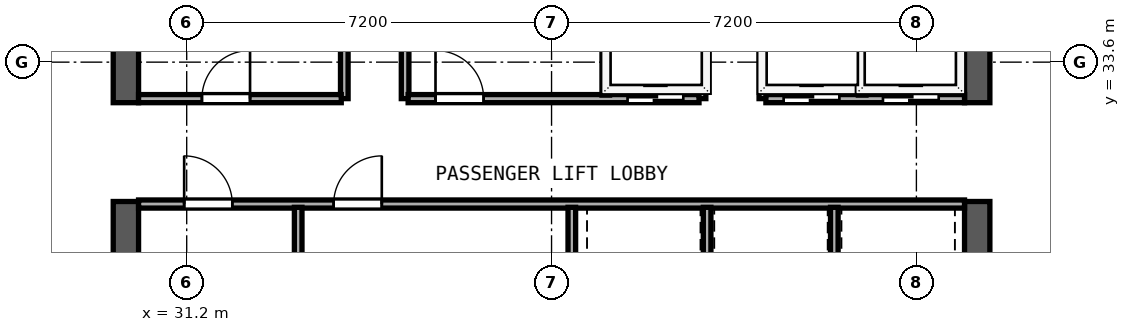
"""IFC4 building model, lengths in metres.
Left out: names, types, materials, properties, quantities, classifications, styles, units other than length and angle.
Written with IfcOpenShell. Run it as: python <this file> out.ifc"""

import sys

from ifc_helpers import new_model, si_unit, direction, frame, frame_2d, origin, place, context, subcontext, project, spatial, rectangle, extrude, element, fill, save


model = new_model("IFC4")
c1 = context("Model", 3, precision=1e-05, world=origin(), true_north=direction((0.0, 1.0)))
c2 = subcontext(c1, "Body", "Model", "MODEL_VIEW")
j1 = project(units=[si_unit("LENGTHUNIT", "METRE"), si_unit("PLANEANGLEUNIT", "RADIAN")], contexts=[c1])
p1 = place(None, origin())
s1 = spatial("IfcSite", under=j1, at=p1, CompositionType="ELEMENT")
p2 = place(p1, origin())
s2 = spatial("IfcBuilding", under=s1, at=p2, CompositionType="ELEMENT")
p3 = place(p2, frame((0.0, 0.0, 282.2)))
s3 = spatial("IfcBuildingStorey", under=s2, at=p3, CompositionType="ELEMENT", Elevation=282.2)
p4 = place(p3, frame((30.0, 26.65, 0.0), z_axis=(0.0, 0.0, 1.0), x_axis=(0.0, 1.0, 0.0)))
e1 = element("IfcWall", 1, at=p4, inside=s3, PredefinedType="SHEAR", context=c2, shape_type="SweptSolid", body=[
    extrude(rectangle(XDim=4.2, YDim=0.5, at=frame_2d((2.1, 0.0))), origin(), (0.0, 0.0, 1.0), 3.72),
])
p5 = place(p3, frame((30.0, 32.8, 0.0), z_axis=(0.0, 0.0, 1.0), x_axis=(0.0, 1.0, 0.0)))
e2 = element("IfcWall", 2, at=p5, inside=s3, PredefinedType="SHEAR", context=c2, shape_type="SweptSolid", body=[
    extrude(rectangle(XDim=10.15, YDim=0.5, at=frame_2d((5.075, 0.0))), origin(), (0.0, 0.0, 1.0), 3.72),
])
p6 = place(p3, frame((46.8, 26.65, 0.0), z_axis=(0.0, 0.0, 1.0), x_axis=(0.0, 1.0, 0.0)))
e3 = element("IfcWall", 3, at=p6, inside=s3, PredefinedType="SHEAR", context=c2, shape_type="SweptSolid", body=[
    extrude(rectangle(XDim=4.2, YDim=0.5, at=frame_2d((2.1, 0.0))), origin(), (0.0, 0.0, 1.0), 3.72),
])
p7 = place(p6, frame((1.35, 0.0, 0.0), z_axis=(0.0, 0.0, 1.0), x_axis=(-1.0, 0.0, 0.0)))
e4 = element("IfcOpeningElement", 4, at=p7, cuts=e3, PredefinedType="OPENING", context=c2, shape_type="SweptSolid", body=[
    extrude(rectangle(XDim=0.9, YDim=2.1, at=frame_2d((0.45, 1.05))), frame((0.0, 0.26, 0.0), z_axis=(0.0, -1.0, 0.0), x_axis=(1.0, 0.0, 0.0)), (0.0, 0.0, 1.0), 0.52),
])
p8 = place(p3, frame((46.8, 32.8, 0.0), z_axis=(0.0, 0.0, 1.0), x_axis=(0.0, 1.0, 0.0)))
e5 = element("IfcWall", 5, at=p8, inside=s3, PredefinedType="SHEAR", context=c2, shape_type="SweptSolid", body=[
    extrude(rectangle(XDim=10.15, YDim=0.5, at=frame_2d((5.075, 0.0))), origin(), (0.0, 0.0, 1.0), 3.72),
])
for number, where, z_axis, x_axis in (
    (6, (34.31, 32.88, 0.0), (0.0, 0.0, 1.0), (0.0, 1.0, 0.0)),
    (7, (35.51, 32.88, 0.0), (0.0, 0.0, 1.0), (0.0, 1.0, 0.0)),
    (8, (41.37, 32.88, 0.0), (0.0, 0.0, 1.0), (0.0, 1.0, 0.0)),
    (9, (42.57, 32.88, 0.0), (0.0, 0.0, 1.0), (0.0, 1.0, 0.0)),
):
    element("IfcWall", number, at=place(p3, frame(where, z_axis=z_axis, x_axis=x_axis)), inside=s3, PredefinedType="SOLIDWALL", context=c2, shape_type="SweptSolid", body=[
        extrude(rectangle(XDim=2.17, YDim=0.15, at=frame_2d((1.085, 0.0))), origin(), (0.0, 0.0, 1.0), 3.72),
    ])
p9 = place(p3, frame((30.25, 32.88, 0.0), z_axis=(0.0, 0.0, 1.0), x_axis=(1.0, 0.0, 0.0)))
e10 = element("IfcWall", 10, at=p9, inside=s3, PredefinedType="SOLIDWALL", context=c2, shape_type="SweptSolid", body=[
    extrude(rectangle(XDim=4.0, YDim=0.16, at=frame_2d((2.0, 0.0))), origin(), (0.0, 0.0, 1.0), 3.72),
])
p10 = place(p9, frame((2.2, 0.0, 0.0), z_axis=(0.0, 0.0, 1.0), x_axis=(-1.0, 0.0, 0.0)))
e11 = element("IfcOpeningElement", 11, at=p10, cuts=e10, PredefinedType="OPENING", context=c2, shape_type="SweptSolid", body=[
    extrude(rectangle(XDim=0.95, YDim=2.12, at=frame_2d((0.475, 1.06))), frame((0.0, 0.09, 0.0), z_axis=(0.0, -1.0, 0.0), x_axis=(1.0, 0.0, 0.0)), (0.0, 0.0, 1.0), 0.18),
])
p11 = place(p3, frame((35.57, 32.88, 0.0), z_axis=(0.0, 0.0, 1.0), x_axis=(1.0, 0.0, 0.0)))
e12 = element("IfcWall", 12, at=p11, inside=s3, PredefinedType="SOLIDWALL", context=c2, shape_type="SweptSolid", body=[
    extrude(rectangle(XDim=5.74, YDim=0.16, at=frame_2d((2.87, 0.0))), origin(), (0.0, 0.0, 1.0), 3.72),
])
p12 = place(p11, frame((1.49, 0.0, 0.0), z_axis=(0.0, 0.0, 1.0), x_axis=(-1.0, 0.0, 0.0)))
e13 = element("IfcOpeningElement", 13, at=p12, cuts=e12, PredefinedType="OPENING", context=c2, shape_type="SweptSolid", body=[
    extrude(rectangle(XDim=0.95, YDim=2.12, at=frame_2d((0.475, 1.06))), frame((0.0, 0.09, 0.0), z_axis=(0.0, -1.0, 0.0), x_axis=(1.0, 0.0, 0.0)), (0.0, 0.0, 1.0), 0.18),
])
p13 = place(p11, frame((5.43, 0.0, 0.0), z_axis=(0.0, 0.0, 1.0), x_axis=(-1.0, 0.0, 0.0)))
e14 = element("IfcOpeningElement", 14, at=p13, cuts=e12, PredefinedType="OPENING", context=c2, shape_type="SweptSolid", body=[
    extrude(rectangle(XDim=1.1, YDim=2.2, at=frame_2d((0.55, 1.1))), frame((0.0, 0.09, 0.0), z_axis=(0.0, -1.0, 0.0), x_axis=(1.0, 0.0, 0.0)), (0.0, 0.0, 1.0), 0.18),
])
p14 = place(p3, frame((42.63, 32.88, 0.0), z_axis=(0.0, 0.0, 1.0), x_axis=(1.0, 0.0, 0.0)))
e15 = element("IfcWall", 15, at=p14, inside=s3, PredefinedType="SOLIDWALL", context=c2, shape_type="SweptSolid", body=[
    extrude(rectangle(XDim=3.92, YDim=0.16, at=frame_2d((1.96, 0.0))), origin(), (0.0, 0.0, 1.0), 3.72),
])
p15 = place(p14, frame((1.45, 0.0, 0.0), z_axis=(0.0, 0.0, 1.0), x_axis=(-1.0, 0.0, 0.0)))
e16 = element("IfcOpeningElement", 16, at=p15, cuts=e15, PredefinedType="OPENING", context=c2, shape_type="SweptSolid", body=[
    extrude(rectangle(XDim=1.1, YDim=2.2, at=frame_2d((0.55, 1.1))), frame((0.0, 0.09, 0.0), z_axis=(0.0, -1.0, 0.0), x_axis=(1.0, 0.0, 0.0)), (0.0, 0.0, 1.0), 0.18),
])
p16 = place(p14, frame((3.41, 0.0, 0.0), z_axis=(0.0, 0.0, 1.0), x_axis=(-1.0, 0.0, 0.0)))
e17 = element("IfcOpeningElement", 17, at=p16, cuts=e15, PredefinedType="OPENING", context=c2, shape_type="SweptSolid", body=[
    extrude(rectangle(XDim=1.1, YDim=2.2, at=frame_2d((0.55, 1.1))), frame((0.0, 0.09, 0.0), z_axis=(0.0, -1.0, 0.0), x_axis=(1.0, 0.0, 0.0)), (0.0, 0.0, 1.0), 0.18),
])
for number, where, z_axis, x_axis in (
    (18, (39.47, 32.95, 0.0), (0.0, 0.0, 1.0), (0.0, 1.0, 0.0)),
    (19, (44.53, 32.95, 0.0), (0.0, 0.0, 1.0), (0.0, 1.0, 0.0)),
):
    element("IfcWall", number, at=place(p3, frame(where, z_axis=z_axis, x_axis=x_axis)), inside=s3, PredefinedType="SOLIDWALL", context=c2, shape_type="SweptSolid", body=[
        extrude(rectangle(XDim=2.05, YDim=0.15, at=frame_2d((1.025, 0.0))), origin(), (0.0, 0.0, 1.0), 3.72),
    ])
p17 = place(p3, frame((30.25, 30.8, 0.0), z_axis=(0.0, 0.0, 1.0), x_axis=(1.0, 0.0, 0.0)))
e20 = element("IfcWall", 20, at=p17, inside=s3, PredefinedType="SOLIDWALL", context=c2, shape_type="SweptSolid", body=[
    extrude(rectangle(XDim=16.3, YDim=0.16, at=frame_2d((8.15, 0.0))), origin(), (0.0, 0.0, 1.0), 3.72),
])
p18 = place(p17, frame((0.9, 0.0, 0.0)))
e21 = element("IfcOpeningElement", 21, at=p18, cuts=e20, PredefinedType="OPENING", context=c2, shape_type="SweptSolid", body=[
    extrude(rectangle(XDim=0.95, YDim=2.12, at=frame_2d((0.475, 1.06))), frame((0.0, 0.09, 0.0), z_axis=(0.0, -1.0, 0.0), x_axis=(1.0, 0.0, 0.0)), (0.0, 0.0, 1.0), 0.18),
])
p19 = place(p17, frame((3.85, 0.0, 0.0)))
e22 = element("IfcOpeningElement", 22, at=p19, cuts=e20, PredefinedType="OPENING", context=c2, shape_type="SweptSolid", body=[
    extrude(rectangle(XDim=0.95, YDim=2.12, at=frame_2d((0.475, 1.06))), frame((0.0, 0.09, 0.0), z_axis=(0.0, -1.0, 0.0), x_axis=(1.0, 0.0, 0.0)), (0.0, 0.0, 1.0), 0.18),
])
p20 = place(p3, frame((38.8, 26.66, 0.0), z_axis=(0.0, 0.0, 1.0), x_axis=(0.0, 1.0, 0.0)))
e23 = element("IfcWall", 23, at=p20, inside=s3, PredefinedType="SOLIDWALL", context=c2, shape_type="SweptSolid", body=[
    extrude(rectangle(XDim=4.075, YDim=0.15, at=frame_2d((2.038, 0.0))), origin(), (0.0, 0.0, 1.0), 3.72),
])
p21 = place(p3, frame((33.4, 26.66, 0.0), z_axis=(0.0, 0.0, 1.0), x_axis=(0.0, 1.0, 0.0)))
e24 = element("IfcWall", 24, at=p21, inside=s3, PredefinedType="PARTITIONING", context=c2, shape_type="SweptSolid", body=[
    extrude(rectangle(XDim=4.075, YDim=0.15, at=frame_2d((2.038, 0.0))), origin(), (0.0, 0.0, 1.0), 3.72),
])
for number, where, z_axis, x_axis in (
    (25, (41.47, 28.75, 0.0), (0.0, 0.0, 1.0), (0.0, 1.0, 0.0)),
    (26, (43.98, 28.75, 0.0), (0.0, 0.0, 1.0), (0.0, 1.0, 0.0)),
):
    element("IfcWall", number, at=place(p3, frame(where, z_axis=z_axis, x_axis=x_axis)), inside=s3, PredefinedType="SOLIDWALL", context=c2, shape_type="SweptSolid", body=[
        extrude(rectangle(XDim=1.985, YDim=0.15, at=frame_2d((0.993, 0.0))), origin(), (0.0, 0.0, 1.0), 3.72),
    ])
p22 = place(p10, origin())
e27 = element("IfcDoor", 27, at=p22, inside=s3, OperationType="SINGLE_SWING_LEFT", PredefinedType="DOOR", context=c2, shape_type="SweptSolid", body=[
    extrude(rectangle(XDim=0.95, YDim=2.12, at=frame_2d((0.475, 1.06))), frame((0.0, 0.025, 0.0), z_axis=(0.0, -1.0, 0.0), x_axis=(1.0, 0.0, 0.0)), (0.0, 0.0, 1.0), 0.05),
])
fill(e11, e27)
p23 = place(p12, origin())
e28 = element("IfcDoor", 28, at=p23, inside=s3, OperationType="SINGLE_SWING_RIGHT", PredefinedType="DOOR", context=c2, shape_type="SweptSolid", body=[
    extrude(rectangle(XDim=0.95, YDim=2.12, at=frame_2d((0.475, 1.06))), frame((0.0, 0.025, 0.0), z_axis=(0.0, -1.0, 0.0), x_axis=(1.0, 0.0, 0.0)), (0.0, 0.0, 1.0), 0.05),
])
fill(e13, e28)
p24 = place(p13, origin())
e29 = element("IfcDoor", 29, at=p24, inside=s3, OperationType="SLIDING_TO_RIGHT", PredefinedType="DOOR", context=c2, shape_type="SweptSolid", body=[
    extrude(rectangle(XDim=1.1, YDim=2.2, at=frame_2d((0.55, 1.1))), frame((0.0, 0.025, 0.0), z_axis=(0.0, -1.0, 0.0), x_axis=(1.0, 0.0, 0.0)), (0.0, 0.0, 1.0), 0.05),
])
fill(e14, e29)
p25 = place(p15, origin())
e30 = element("IfcDoor", 30, at=p25, inside=s3, OperationType="SLIDING_TO_RIGHT", PredefinedType="DOOR", context=c2, shape_type="SweptSolid", body=[
    extrude(rectangle(XDim=1.1, YDim=2.2, at=frame_2d((0.55, 1.1))), frame((0.0, 0.025, 0.0), z_axis=(0.0, -1.0, 0.0), x_axis=(1.0, 0.0, 0.0)), (0.0, 0.0, 1.0), 0.05),
])
fill(e16, e30)
p26 = place(p16, origin())
e31 = element("IfcDoor", 31, at=p26, inside=s3, OperationType="SLIDING_TO_RIGHT", PredefinedType="DOOR", context=c2, shape_type="SweptSolid", body=[
    extrude(rectangle(XDim=1.1, YDim=2.2, at=frame_2d((0.55, 1.1))), frame((0.0, 0.025, 0.0), z_axis=(0.0, -1.0, 0.0), x_axis=(1.0, 0.0, 0.0)), (0.0, 0.0, 1.0), 0.05),
])
fill(e17, e31)
p27 = place(p18, origin())
e32 = element("IfcDoor", 32, at=p27, inside=s3, OperationType="SINGLE_SWING_LEFT", PredefinedType="DOOR", context=c2, shape_type="SweptSolid", body=[
    extrude(rectangle(XDim=0.95, YDim=2.12, at=frame_2d((0.475, 1.06))), frame((0.0, 0.025, 0.0), z_axis=(0.0, -1.0, 0.0), x_axis=(1.0, 0.0, 0.0)), (0.0, 0.0, 1.0), 0.05),
])
fill(e21, e32)
p28 = place(p19, origin())
e33 = element("IfcDoor", 33, at=p28, inside=s3, OperationType="SINGLE_SWING_RIGHT", PredefinedType="DOOR", context=c2, shape_type="SweptSolid", body=[
    extrude(rectangle(XDim=0.95, YDim=2.12, at=frame_2d((0.475, 1.06))), frame((0.0, 0.025, 0.0), z_axis=(0.0, -1.0, 0.0), x_axis=(1.0, 0.0, 0.0)), (0.0, 0.0, 1.0), 0.05),
])
fill(e22, e33)
save(model, sys.argv[1])
